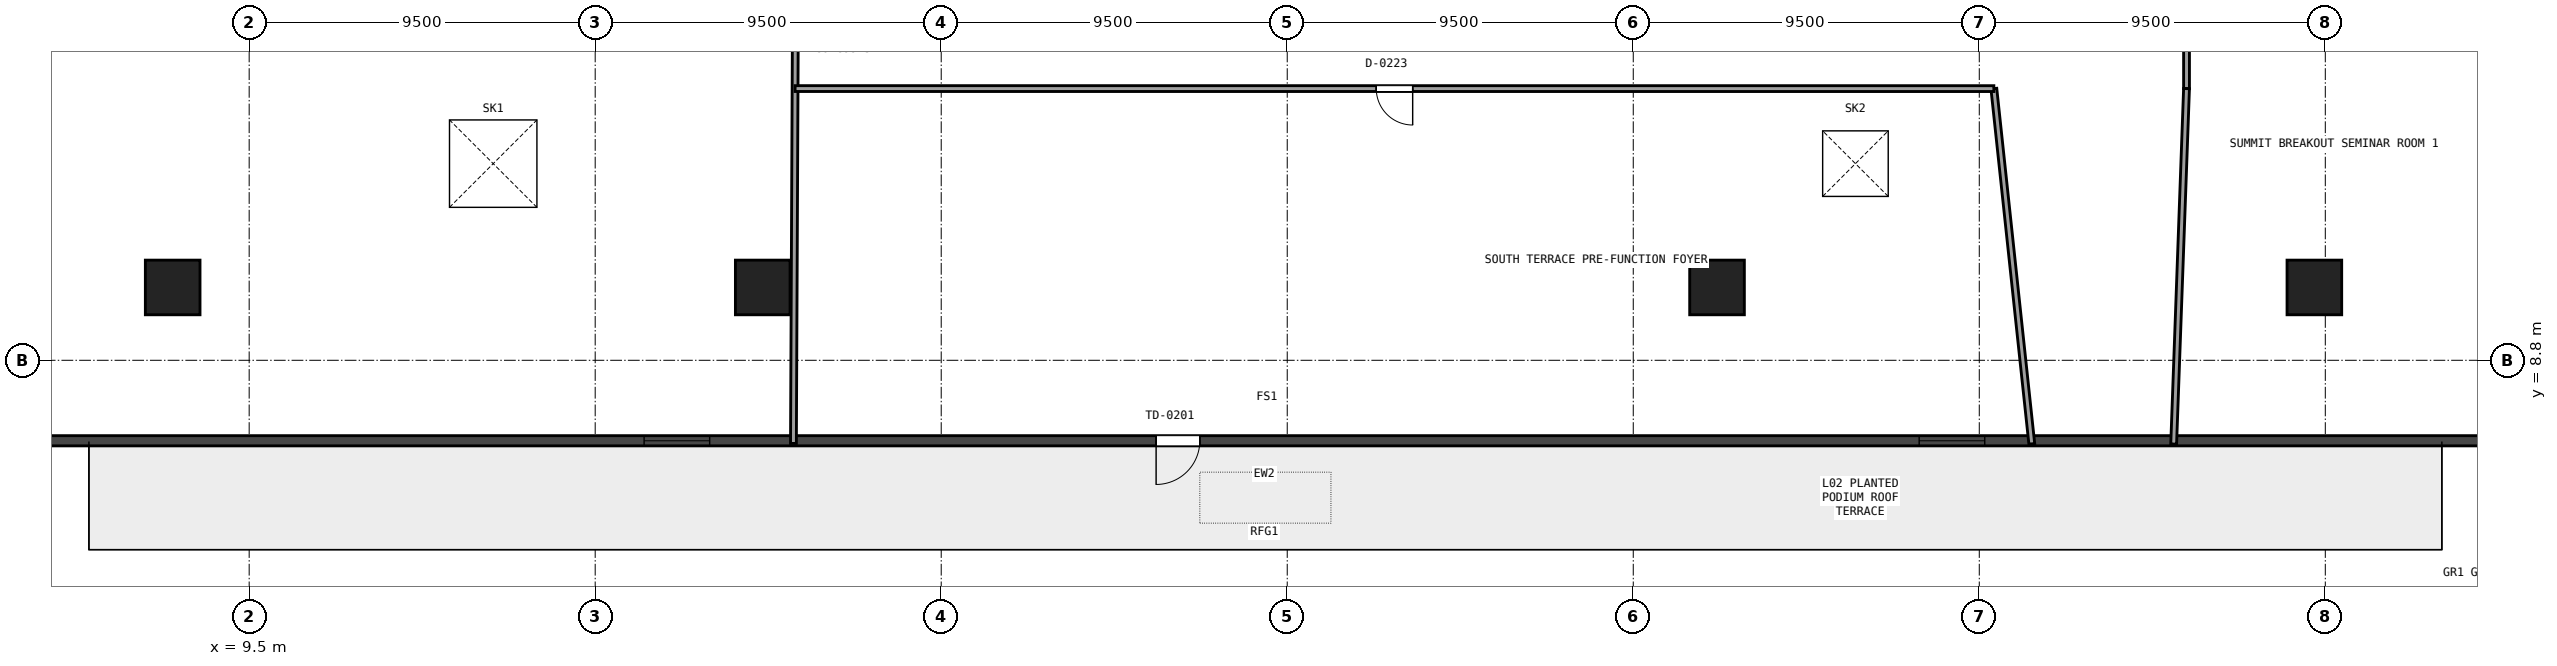
"""IFC4 building model, lengths in metres.
Left out: names, types, materials, properties, quantities, classifications, styles, units other than length and angle.
Written with IfcOpenShell. Run it as: python <this file> out.ifc"""

import sys

from ifc_helpers import new_model, si_unit, direction, frame, frame_2d, origin, origin_2d, place, context, subcontext, project, spatial, rectangle, extrude, element, fill, save


model = new_model("IFC4")
c1 = context("Model", 3, precision=1e-05, world=origin(), true_north=direction((0.0, 1.0)))
c2 = subcontext(c1, "Body", "Model", "MODEL_VIEW")
j1 = project(units=[si_unit("LENGTHUNIT", "METRE"), si_unit("PLANEANGLEUNIT", "RADIAN")], contexts=[c1])
p1 = place(None, origin())
s1 = spatial("IfcSite", under=j1, at=p1, CompositionType="ELEMENT")
p2 = place(p1, origin())
s2 = spatial("IfcBuilding", under=s1, at=p2, CompositionType="ELEMENT")
p3 = place(p2, frame((0.0, 0.0, 10.8)))
s3 = spatial("IfcBuildingStorey", under=s2, at=p3, CompositionType="ELEMENT", Elevation=10.8)
for number, where, z_axis, x_axis in (
    (1, (7.4, 10.8, 0.0), (0.0, 0.0, 1.0), (1.0, 0.0, 0.0)),
    (2, (23.6, 10.8, 0.0), (0.0, 0.0, 1.0), (1.0, 0.0, 0.0)),
    (3, (49.8, 10.8, 0.0), (0.0, 0.0, 1.0), (1.0, 0.0, 0.0)),
    (4, (66.2, 10.8, 0.0), (0.0, 0.0, 1.0), (1.0, 0.0, 0.0)),
):
    element("IfcColumn", number, at=place(p3, frame(where, z_axis=z_axis, x_axis=x_axis)), inside=s3, PredefinedType="COLUMN", context=c2, shape_type="SweptSolid", body=[
        extrude(rectangle(XDim=1.5, YDim=1.5, at=origin_2d()), origin(), (0.0, 0.0, 1.0), 5.05),
    ])
p4 = place(p3, frame((71.06, 6.59, 0.0), z_axis=(0.0, 0.0, 1.0), x_axis=(-1.0, 0.0, 0.0)))
e5 = element("IfcWall", 5, at=p4, inside=s3, PredefinedType="SOLIDWALL", context=c2, shape_type="SweptSolid", body=[
    extrude(rectangle(XDim=67.32, YDim=0.28, at=frame_2d((33.66, 0.0))), origin(), (0.0, 0.0, 1.0), 5.05),
])
p5 = place(p4, frame((13.91, 0.0, 0.95)))
e6 = element("IfcOpeningElement", 6, at=p5, cuts=e5, PredefinedType="OPENING", context=c2, shape_type="SweptSolid", body=[
    extrude(rectangle(XDim=1.8, YDim=2.3, at=frame_2d((0.9, 1.15))), frame((0.0, 0.15, 0.0), z_axis=(0.0, -1.0, 0.0), x_axis=(1.0, 0.0, 0.0)), (0.0, 0.0, 1.0), 0.3),
])
p6 = place(p4, frame((48.917, 0.0, 0.95)))
e7 = element("IfcOpeningElement", 7, at=p6, cuts=e5, PredefinedType="OPENING", context=c2, shape_type="SweptSolid", body=[
    extrude(rectangle(XDim=1.8, YDim=2.3, at=frame_2d((0.9, 1.15))), frame((0.0, 0.15, 0.0), z_axis=(0.0, -1.0, 0.0), x_axis=(1.0, 0.0, 0.0)), (0.0, 0.0, 1.0), 0.3),
])
p7 = place(p4, frame((35.46, 0.0, 0.0)))
e8 = element("IfcOpeningElement", 8, at=p7, cuts=e5, PredefinedType="OPENING", context=c2, shape_type="SweptSolid", body=[
    extrude(rectangle(XDim=1.2, YDim=2.2, at=frame_2d((0.6, 1.1))), frame((0.0, 0.15, 0.0), z_axis=(0.0, -1.0, 0.0), x_axis=(1.0, 0.0, 0.0)), (0.0, 0.0, 1.0), 0.3),
])
p8 = place(p3, frame((24.443, 6.517, 0.0), z_axis=(0.0, 0.0, 1.0), x_axis=(0.004573455882, 0.999989541696, 0.0)))
e9 = element("IfcWall", 9, at=p8, inside=s3, PredefinedType="PARTITIONING", context=c2, shape_type="SweptSolid", body=[
    extrude(rectangle(XDim=17.883, YDim=0.16, at=frame_2d((8.941, 0.0))), origin(), (0.0, 0.0, 1.0), 4.135),
])
p9 = place(p3, frame((58.442, 6.505, 0.0), z_axis=(0.0, 0.0, 1.0), x_axis=(-0.106210644154, 0.9943436524, 0.0)))
e10 = element("IfcWall", 10, at=p9, inside=s3, PredefinedType="PARTITIONING", context=c2, shape_type="SweptSolid", body=[
    extrude(rectangle(XDim=9.811, YDim=0.16, at=frame_2d((4.905, 0.0))), origin(), (0.0, 0.0, 1.0), 4.191),
])
p10 = place(p3, frame((57.4, 16.26, 0.0), z_axis=(0.0, 0.0, 1.0), x_axis=(-0.99999999956, 2.967205e-05, 0.0)))
e11 = element("IfcWall", 11, at=p10, inside=s3, PredefinedType="PARTITIONING", context=c2, shape_type="SweptSolid", body=[
    extrude(rectangle(XDim=32.912, YDim=0.16, at=frame_2d((16.456, 0.0))), origin(), (0.0, 0.0, 1.0), 4.203),
])
p11 = place(p10, frame((15.956, 0.0, 0.0)))
e12 = element("IfcOpeningElement", 12, at=p11, cuts=e11, PredefinedType="OPENING", context=c2, shape_type="SweptSolid", body=[
    extrude(rectangle(XDim=1.0, YDim=2.15, at=frame_2d((0.5, 1.075))), frame((0.0, 0.09, 0.0), z_axis=(0.0, -1.0, 0.0), x_axis=(1.0, 0.0, 0.0)), (0.0, 0.0, 1.0), 0.18),
])
p12 = place(p3, frame((62.69, 20.69, 0.0), z_axis=(0.0, 0.0, 1.0), x_axis=(0.0, -1.0, 0.0)))
e13 = element("IfcWall", 13, at=p12, inside=s3, PredefinedType="PARTITIONING", context=c2, shape_type="SweptSolid", body=[
    extrude(rectangle(XDim=4.43, YDim=0.16, at=frame_2d((2.215, 0.0))), origin(), (0.0, 0.0, 1.0), 4.135),
])
p13 = place(p3, frame((62.69, 16.26, 0.0), z_axis=(0.0, 0.0, 1.0), x_axis=(-0.036147159792, -0.999346477874, 0.0)))
e14 = element("IfcWall", 14, at=p13, inside=s3, PredefinedType="PARTITIONING", context=c2, shape_type="SweptSolid", body=[
    extrude(rectangle(XDim=9.766, YDim=0.16, at=frame_2d((4.883, 0.0))), origin(), (0.0, 0.0, 1.0), 4.191),
])
p14 = place(p5, origin())
e15 = element("IfcWindow", 15, at=p14, inside=s3, PartitioningType="SINGLE_PANEL", PredefinedType="WINDOW", context=c2, shape_type="SweptSolid", body=[
    extrude(rectangle(XDim=1.8, YDim=2.3, at=frame_2d((0.9, 1.15))), frame((0.0, 0.03, 0.0), z_axis=(0.0, -1.0, 0.0), x_axis=(1.0, 0.0, 0.0)), (0.0, 0.0, 1.0), 0.06),
])
fill(e6, e15)
p15 = place(p6, origin())
e16 = element("IfcWindow", 16, at=p15, inside=s3, PartitioningType="SINGLE_PANEL", PredefinedType="WINDOW", context=c2, shape_type="SweptSolid", body=[
    extrude(rectangle(XDim=1.8, YDim=2.3, at=frame_2d((0.9, 1.15))), frame((0.0, 0.03, 0.0), z_axis=(0.0, -1.0, 0.0), x_axis=(1.0, 0.0, 0.0)), (0.0, 0.0, 1.0), 0.06),
])
fill(e7, e16)
p16 = place(p7, origin())
e17 = element("IfcDoor", 17, at=p16, inside=s3, OperationType="SINGLE_SWING_RIGHT", PredefinedType="DOOR", context=c2, shape_type="SweptSolid", body=[
    extrude(rectangle(XDim=1.2, YDim=2.2, at=frame_2d((0.6, 1.1))), frame((0.0, 0.025, 0.0), z_axis=(0.0, -1.0, 0.0), x_axis=(1.0, 0.0, 0.0)), (0.0, 0.0, 1.0), 0.05),
])
fill(e8, e17)
p17 = place(p3, frame((0.0, 0.0, -0.35)))
p18 = place(p17, frame((16.2, 14.2, 0.0)))
p19 = place(p18, frame((0.0, 0.0, 0.3)))
e18 = element("IfcWindow", 18, at=p19, inside=s3, PartitioningType="SINGLE_PANEL", PredefinedType="SKYLIGHT", context=c2, shape_type="SweptSolid", body=[
    extrude(rectangle(XDim=2.4, YDim=2.4, at=origin_2d()), origin(), (0.0, 0.0, 1.0), 0.05),
])
p20 = place(p17, frame((53.6, 14.2, 0.0)))
p21 = place(p20, frame((0.0, 0.0, 0.3)))
e19 = element("IfcWindow", 19, at=p21, inside=s3, PartitioningType="SINGLE_PANEL", PredefinedType="SKYLIGHT", context=c2, shape_type="SweptSolid", body=[
    extrude(rectangle(XDim=1.8, YDim=1.8, at=origin_2d()), origin(), (0.0, 0.0, 1.0), 0.05),
])
p22 = place(p11, origin())
e20 = element("IfcDoor", 20, at=p22, inside=s3, OperationType="SINGLE_SWING_LEFT", PredefinedType="DOOR", context=c2, shape_type="SweptSolid", body=[
    extrude(rectangle(XDim=1.0, YDim=2.15, at=frame_2d((0.5, 1.075))), frame((0.0, 0.025, 0.0), z_axis=(0.0, -1.0, 0.0), x_axis=(1.0, 0.0, 0.0)), (0.0, 0.0, 1.0), 0.05),
])
fill(e12, e20)
save(model, sys.argv[1])
